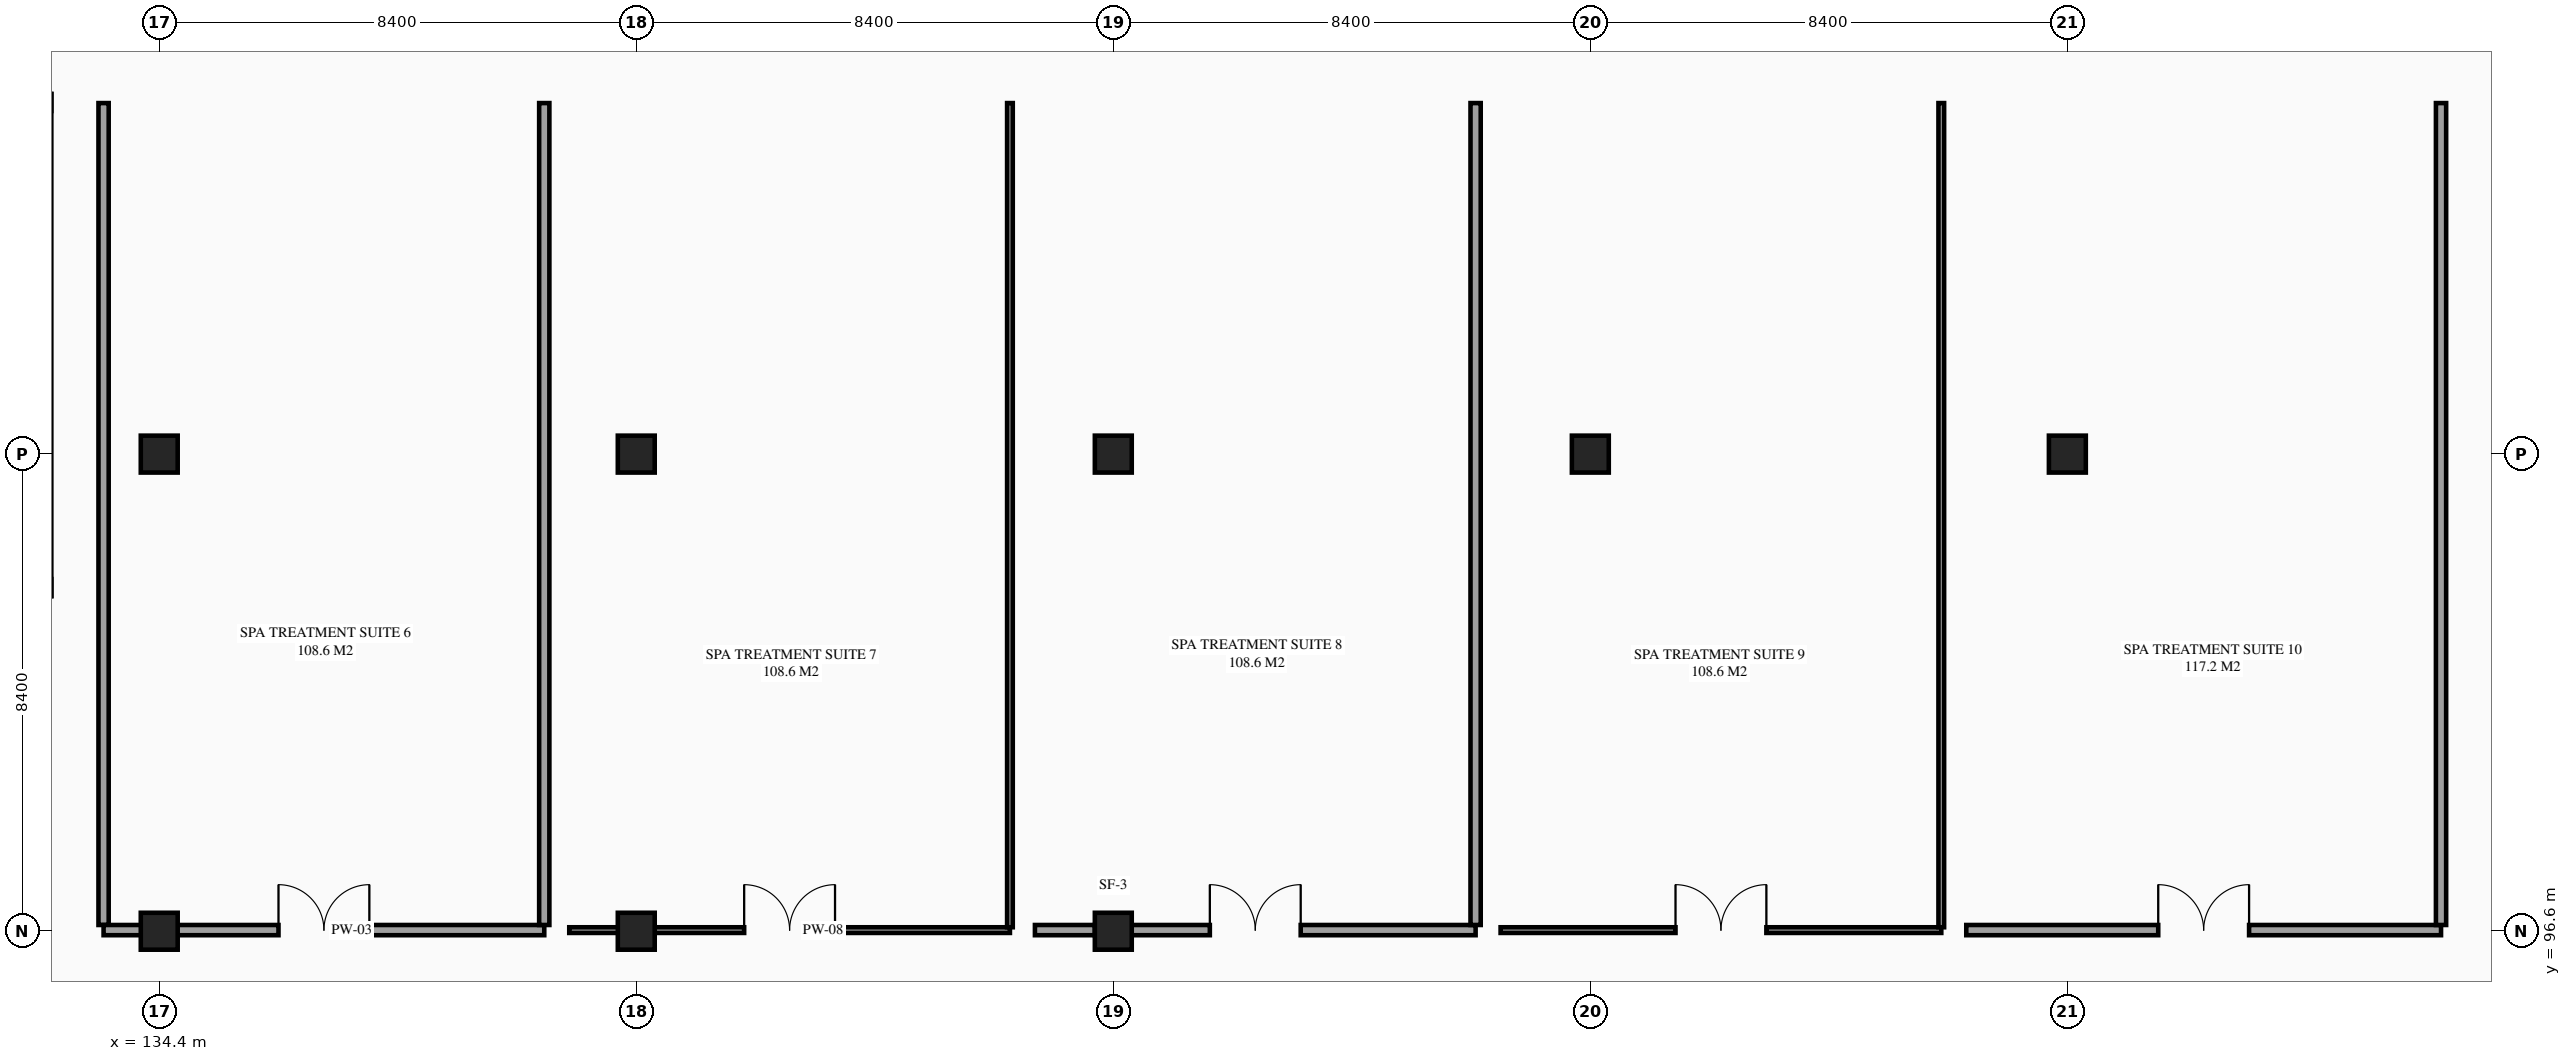
"""IFC4 building model, lengths in metres.
Left out: names, types, materials, properties, quantities, classifications, styles, units other than length and angle.
Written with IfcOpenShell. Run it as: python <this file> out.ifc"""

import sys

from ifc_helpers import new_model, si_unit, direction, frame, frame_2d, origin, origin_2d, place, context, subcontext, project, spatial, rectangle, extrude, element, fill, save


model = new_model("IFC4")
c1 = context("Model", 3, precision=1e-05, world=origin(), true_north=direction((0.0, 1.0)))
c2 = subcontext(c1, "Body", "Model", "MODEL_VIEW")
j1 = project(units=[si_unit("LENGTHUNIT", "METRE"), si_unit("PLANEANGLEUNIT", "RADIAN")], contexts=[c1])
p1 = place(None, origin())
s1 = spatial("IfcSite", under=j1, at=p1, CompositionType="ELEMENT")
p2 = place(p1, origin())
s2 = spatial("IfcBuilding", under=s1, at=p2, CompositionType="ELEMENT")
p3 = place(p2, frame((0.0, 0.0, 5.4)))
s3 = spatial("IfcBuildingStorey", under=s2, at=p3, CompositionType="ELEMENT", Elevation=5.4)
for number, where, z_axis, x_axis in (
    (1, (134.4, 96.6, 0.0), (0.0, 0.0, 1.0), (1.0, 0.0, 0.0)),
    (2, (134.4, 105.0, 0.0), (0.0, 0.0, 1.0), (1.0, 0.0, 0.0)),
    (3, (142.8, 96.6, 0.0), (0.0, 0.0, 1.0), (1.0, 0.0, 0.0)),
    (4, (142.8, 105.0, 0.0), (0.0, 0.0, 1.0), (1.0, 0.0, 0.0)),
    (5, (151.2, 96.6, 0.0), (0.0, 0.0, 1.0), (1.0, 0.0, 0.0)),
    (6, (151.2, 105.0, 0.0), (0.0, 0.0, 1.0), (1.0, 0.0, 0.0)),
    (7, (159.6, 105.0, 0.0), (0.0, 0.0, 1.0), (1.0, 0.0, 0.0)),
    (8, (168.0, 105.0, 0.0), (0.0, 0.0, 1.0), (1.0, 0.0, 0.0)),
):
    element("IfcColumn", number, at=place(p3, frame(where, z_axis=z_axis, x_axis=x_axis)), inside=s3, PredefinedType="COLUMN", context=c2, shape_type="SweptSolid", body=[
        extrude(rectangle(XDim=0.65, YDim=0.65, at=origin_2d()), origin(), (0.0, 0.0, 1.0), 4.5),
    ])
p4 = place(p3, frame((134.4, 96.62, 0.0), z_axis=(0.0, 0.0, 1.0), x_axis=(1.0, 0.0, 0.0)))
e9 = element("IfcWall", 9, at=p4, inside=s3, PredefinedType="PARTITIONING", context=c2, shape_type="SweptSolid", body=[
    extrude(rectangle(XDim=6.78, YDim=0.18, at=frame_2d((3.39, 0.0))), origin(), (0.0, 0.0, 1.0), 3.83),
])
p5 = place(p4, frame((2.1, 0.0, 0.0)))
e10 = element("IfcOpeningElement", 10, at=p5, cuts=e9, PredefinedType="OPENING", context=c2, shape_type="SweptSolid", body=[
    extrude(rectangle(XDim=1.6, YDim=2.25, at=frame_2d((0.8, 1.125))), frame((0.0, 0.1, 0.0), z_axis=(0.0, -1.0, 0.0), x_axis=(1.0, 0.0, 0.0)), (0.0, 0.0, 1.0), 0.2),
])
for number, where, z_axis, x_axis in (
    (11, (133.42, 96.71, 0.0), (0.0, 0.0, 1.0), (0.0, 1.0, 0.0)),
    (12, (141.18, 96.71, 0.0), (0.0, 0.0, 1.0), (0.0, 1.0, 0.0)),
):
    element("IfcWall", number, at=place(p3, frame(where, z_axis=z_axis, x_axis=x_axis)), inside=s3, PredefinedType="PARTITIONING", context=c2, shape_type="SweptSolid", body=[
        extrude(rectangle(XDim=14.47, YDim=0.18, at=frame_2d((7.235, 0.0))), origin(), (0.0, 0.0, 1.0), 4.235),
    ])
p6 = place(p3, frame((142.8, 96.62, 0.0), z_axis=(0.0, 0.0, 1.0), x_axis=(1.0, 0.0, 0.0)))
e13 = element("IfcWall", 13, at=p6, inside=s3, PredefinedType="PARTITIONING", context=c2, shape_type="SweptSolid", body=[
    extrude(rectangle(XDim=6.58, YDim=0.1, at=frame_2d((3.29, 0.0))), origin(), (0.0, 0.0, 1.0), 3.44),
])
p7 = place(p6, frame((1.9, 0.0, 0.0)))
e14 = element("IfcOpeningElement", 14, at=p7, cuts=e13, PredefinedType="OPENING", context=c2, shape_type="SweptSolid", body=[
    extrude(rectangle(XDim=1.6, YDim=2.25, at=frame_2d((0.8, 1.125))), frame((0.0, 0.06, 0.0), z_axis=(0.0, -1.0, 0.0), x_axis=(1.0, 0.0, 0.0)), (0.0, 0.0, 1.0), 0.12),
])
p8 = place(p3, frame((149.38, 96.67, 0.0), z_axis=(0.0, 0.0, 1.0), x_axis=(0.0, 1.0, 0.0)))
e15 = element("IfcWall", 15, at=p8, inside=s3, PredefinedType="PARTITIONING", context=c2, shape_type="SweptSolid", body=[
    extrude(rectangle(XDim=14.51, YDim=0.1, at=frame_2d((7.255, 0.0))), origin(), (0.0, 0.0, 1.0), 4.235),
])
p9 = place(p3, frame((150.875, 96.62, 0.0), z_axis=(0.0, 0.0, 1.0), x_axis=(1.0, 0.0, 0.0)))
e16 = element("IfcWall", 16, at=p9, inside=s3, PredefinedType="PARTITIONING", context=c2, shape_type="SweptSolid", body=[
    extrude(rectangle(XDim=6.705, YDim=0.18, at=frame_2d((3.353, 0.0))), origin(), (0.0, 0.0, 1.0), 4.235),
])
p10 = place(p9, frame((2.025, 0.0, 0.0)))
e17 = element("IfcOpeningElement", 17, at=p10, cuts=e16, PredefinedType="OPENING", context=c2, shape_type="SweptSolid", body=[
    extrude(rectangle(XDim=1.6, YDim=2.25, at=frame_2d((0.8, 1.125))), frame((0.0, 0.1, 0.0), z_axis=(0.0, -1.0, 0.0), x_axis=(1.0, 0.0, 0.0)), (0.0, 0.0, 1.0), 0.2),
])
p11 = place(p3, frame((157.58, 96.71, 0.0), z_axis=(0.0, 0.0, 1.0), x_axis=(0.0, 1.0, 0.0)))
e18 = element("IfcWall", 18, at=p11, inside=s3, PredefinedType="PARTITIONING", context=c2, shape_type="SweptSolid", body=[
    extrude(rectangle(XDim=14.47, YDim=0.18, at=frame_2d((7.235, 0.0))), origin(), (0.0, 0.0, 1.0), 4.235),
])
p12 = place(p3, frame((158.02, 96.62, 0.0), z_axis=(0.0, 0.0, 1.0), x_axis=(1.0, 0.0, 0.0)))
e19 = element("IfcWall", 19, at=p12, inside=s3, PredefinedType="PARTITIONING", context=c2, shape_type="SweptSolid", body=[
    extrude(rectangle(XDim=7.76, YDim=0.1, at=frame_2d((3.88, 0.0))), origin(), (0.0, 0.0, 1.0), 4.235),
])
p13 = place(p12, frame((3.08, 0.0, 0.0)))
e20 = element("IfcOpeningElement", 20, at=p13, cuts=e19, PredefinedType="OPENING", context=c2, shape_type="SweptSolid", body=[
    extrude(rectangle(XDim=1.6, YDim=2.25, at=frame_2d((0.8, 1.125))), frame((0.0, 0.06, 0.0), z_axis=(0.0, -1.0, 0.0), x_axis=(1.0, 0.0, 0.0)), (0.0, 0.0, 1.0), 0.12),
])
p14 = place(p3, frame((165.78, 96.67, 0.0), z_axis=(0.0, 0.0, 1.0), x_axis=(0.0, 1.0, 0.0)))
e21 = element("IfcWall", 21, at=p14, inside=s3, PredefinedType="PARTITIONING", context=c2, shape_type="SweptSolid", body=[
    extrude(rectangle(XDim=14.51, YDim=0.1, at=frame_2d((7.255, 0.0))), origin(), (0.0, 0.0, 1.0), 4.235),
])
p15 = place(p3, frame((166.22, 96.62, 0.0), z_axis=(0.0, 0.0, 1.0), x_axis=(1.0, 0.0, 0.0)))
e22 = element("IfcWall", 22, at=p15, inside=s3, PredefinedType="PARTITIONING", context=c2, shape_type="SweptSolid", body=[
    extrude(rectangle(XDim=8.36, YDim=0.18, at=frame_2d((4.18, 0.0))), origin(), (0.0, 0.0, 1.0), 4.235),
])
p16 = place(p15, frame((3.38, 0.0, 0.0)))
e23 = element("IfcOpeningElement", 23, at=p16, cuts=e22, PredefinedType="OPENING", context=c2, shape_type="SweptSolid", body=[
    extrude(rectangle(XDim=1.6, YDim=2.25, at=frame_2d((0.8, 1.125))), frame((0.0, 0.1, 0.0), z_axis=(0.0, -1.0, 0.0), x_axis=(1.0, 0.0, 0.0)), (0.0, 0.0, 1.0), 0.2),
])
p17 = place(p3, frame((174.58, 96.71, 0.0), z_axis=(0.0, 0.0, 1.0), x_axis=(0.0, 1.0, 0.0)))
e24 = element("IfcWall", 24, at=p17, inside=s3, PredefinedType="PARTITIONING", context=c2, shape_type="SweptSolid", body=[
    extrude(rectangle(XDim=14.47, YDim=0.18, at=frame_2d((7.235, 0.0))), origin(), (0.0, 0.0, 1.0), 4.235),
])
p18 = place(p3, frame((133.42, 96.62, 0.0), z_axis=(0.0, 0.0, 1.0), x_axis=(1.0, 0.0, 0.0)))
e25 = element("IfcWall", 25, at=p18, inside=s3, PredefinedType="PARTITIONING", context=c2, shape_type="SweptSolid", body=[
    extrude(rectangle(XDim=0.98, YDim=0.18, at=frame_2d((0.49, 0.0))), origin(), (0.0, 0.0, 1.0), 3.39),
])
p19 = place(p3, frame((141.62, 96.62, 0.0), z_axis=(0.0, 0.0, 1.0), x_axis=(1.0, 0.0, 0.0)))
e26 = element("IfcWall", 26, at=p19, inside=s3, PredefinedType="PARTITIONING", context=c2, shape_type="SweptSolid", body=[
    extrude(rectangle(XDim=1.18, YDim=0.1, at=frame_2d((0.59, 0.0))), origin(), (0.0, 0.0, 1.0), 3.83),
])
p20 = place(p3, frame((149.82, 96.62, 0.0), z_axis=(0.0, 0.0, 1.0), x_axis=(1.0, 0.0, 0.0)))
e27 = element("IfcWall", 27, at=p20, inside=s3, PredefinedType="PARTITIONING", context=c2, shape_type="SweptSolid", body=[
    extrude(rectangle(XDim=1.055, YDim=0.18, at=frame_2d((0.527, 0.0))), origin(), (0.0, 0.0, 1.0), 3.44),
])
p21 = place(p5, origin())
e28 = element("IfcDoor", 28, at=p21, inside=s3, OperationType="DOUBLE_DOOR_SINGLE_SWING", PredefinedType="DOOR", context=c2, shape_type="SweptSolid", body=[
    extrude(rectangle(XDim=1.6, YDim=2.25, at=frame_2d((0.8, 1.125))), frame((0.0, 0.025, 0.0), z_axis=(0.0, -1.0, 0.0), x_axis=(1.0, 0.0, 0.0)), (0.0, 0.0, 1.0), 0.05),
])
fill(e10, e28)
p22 = place(p7, origin())
e29 = element("IfcDoor", 29, at=p22, inside=s3, OperationType="DOUBLE_DOOR_SINGLE_SWING", PredefinedType="DOOR", context=c2, shape_type="SweptSolid", body=[
    extrude(rectangle(XDim=1.6, YDim=2.25, at=frame_2d((0.8, 1.125))), frame((0.0, 0.025, 0.0), z_axis=(0.0, -1.0, 0.0), x_axis=(1.0, 0.0, 0.0)), (0.0, 0.0, 1.0), 0.05),
])
fill(e14, e29)
p23 = place(p10, origin())
e30 = element("IfcDoor", 30, at=p23, inside=s3, OperationType="DOUBLE_DOOR_SINGLE_SWING", PredefinedType="DOOR", context=c2, shape_type="SweptSolid", body=[
    extrude(rectangle(XDim=1.6, YDim=2.25, at=frame_2d((0.8, 1.125))), frame((0.0, 0.025, 0.0), z_axis=(0.0, -1.0, 0.0), x_axis=(1.0, 0.0, 0.0)), (0.0, 0.0, 1.0), 0.05),
])
fill(e17, e30)
p24 = place(p13, origin())
e31 = element("IfcDoor", 31, at=p24, inside=s3, OperationType="DOUBLE_DOOR_SINGLE_SWING", PredefinedType="DOOR", context=c2, shape_type="SweptSolid", body=[
    extrude(rectangle(XDim=1.6, YDim=2.25, at=frame_2d((0.8, 1.125))), frame((0.0, 0.025, 0.0), z_axis=(0.0, -1.0, 0.0), x_axis=(1.0, 0.0, 0.0)), (0.0, 0.0, 1.0), 0.05),
])
fill(e20, e31)
p25 = place(p16, origin())
e32 = element("IfcDoor", 32, at=p25, inside=s3, OperationType="DOUBLE_DOOR_SINGLE_SWING", PredefinedType="DOOR", context=c2, shape_type="SweptSolid", body=[
    extrude(rectangle(XDim=1.6, YDim=2.25, at=frame_2d((0.8, 1.125))), frame((0.0, 0.025, 0.0), z_axis=(0.0, -1.0, 0.0), x_axis=(1.0, 0.0, 0.0)), (0.0, 0.0, 1.0), 0.05),
])
fill(e23, e32)
save(model, sys.argv[1])
